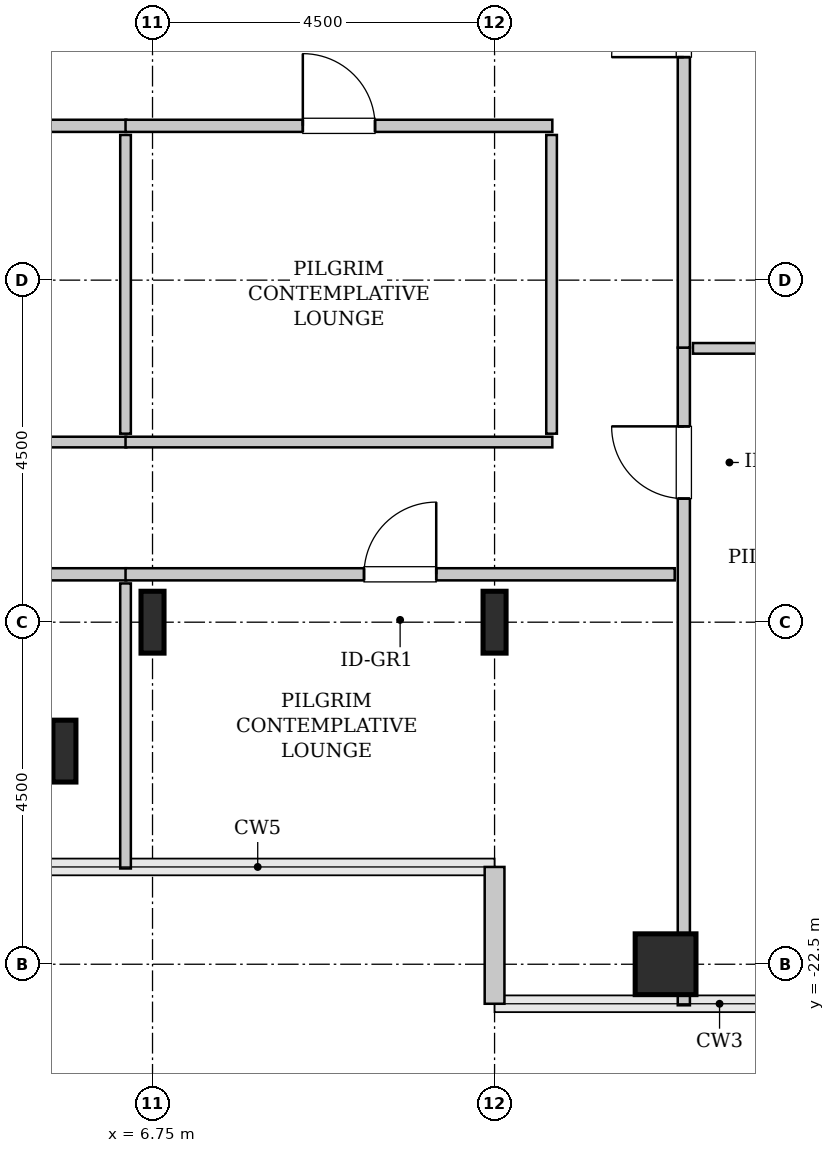
"""IFC4 building model, lengths in metres.
Left out: names, types, materials, properties, quantities, classifications, styles, units other than length and angle.
Written with IfcOpenShell. Run it as: python <this file> out.ifc"""

import sys

from ifc_helpers import new_model, si_unit, direction, frame, frame_2d, origin, origin_2d, place, context, subcontext, project, spatial, rectangle, hollow_rectangle, i_section, extrude, source, transform, mapped, element, fill, save


model = new_model("IFC4")
c1 = context("Model", 3, precision=1e-05, world=origin(), true_north=direction((0.0, 1.0)))
c2 = subcontext(c1, "Body", "Model", "MODEL_VIEW")
j1 = project(units=[si_unit("LENGTHUNIT", "METRE"), si_unit("PLANEANGLEUNIT", "RADIAN")], contexts=[c1])
p1 = place(None, origin())
s1 = spatial("IfcSite", under=j1, at=p1, CompositionType="ELEMENT")
p2 = place(p1, origin())
s2 = spatial("IfcBuilding", under=s1, at=p2, CompositionType="ELEMENT")
p3 = place(p2, frame((0.0, 0.0, 183.0)))
s3 = spatial("IfcBuildingStorey", under=s2, at=p3, CompositionType="ELEMENT", Elevation=183.0)
m1 = source(origin(), c2, "Body", "SweptSolid", [
    extrude(i_section(OverallWidth=0.303, OverallDepth=0.814, WebThickness=0.021, FlangeThickness=0.04, FilletRadius=0.03, at=origin_2d()), origin(), (0.0, 0.0, 1.0), 3.8),
])
for number, where, z_axis, x_axis in (
    (1, (5.591, -19.696, 0.0), (0.0, 0.0, 1.0), (1.0, 0.0, 0.0)),
    (2, (6.75, -18.0, 0.0), (0.0, 0.0, 1.0), (1.0, 0.0, 0.0)),
    (3, (11.25, -18.0, 0.0), (0.0, 0.0, 1.0), (1.0, 0.0, 0.0)),
):
    element("IfcColumn", number, at=place(p3, frame(where, z_axis=z_axis, x_axis=x_axis)), inside=s3, PredefinedType="COLUMN", context=c2, shape_type="MappedRepresentation", body=[
        mapped(m1, transform((0.0, 0.0, 0.0), x_axis=(1.0, 0.0, 0.0), y_axis=(0.0, 1.0, 0.0), z_axis=(0.0, 0.0, 1.0), scale=1.0)),
    ])
m2 = source(origin(), c2, "Body", "SweptSolid", [
    extrude(hollow_rectangle(XDim=0.8, YDim=0.8, WallThickness=0.04, InnerFilletRadius=0.04, OuterFilletRadius=0.08, at=origin_2d()), origin(), (0.0, 0.0, 1.0), 3.8),
])
p4 = place(p3, frame((13.5, -22.5, 0.0), z_axis=(0.0, 0.0, 1.0), x_axis=(1.0, 0.0, 0.0)))
e4 = element("IfcColumn", 4, at=p4, inside=s3, PredefinedType="COLUMN", context=c2, shape_type="MappedRepresentation", body=[
    mapped(m2, transform((0.0, 0.0, 0.0), x_axis=(1.0, 0.0, 0.0), y_axis=(0.0, 1.0, 0.0), z_axis=(0.0, 0.0, 1.0), scale=1.0)),
])
m3 = source(origin(), c2, "Body", "SweptSolid", [
    extrude(rectangle(XDim=1.8, YDim=0.26, at=frame_2d((0.9, 0.0))), origin(), (0.0, 0.0, 1.0), 3.55),
])
p5 = place(p3, frame((11.25, -21.22, 0.0), z_axis=(0.0, 0.0, 1.0), x_axis=(0.0, -1.0, 0.0)))
e5 = element("IfcWall", 5, at=p5, inside=s3, PredefinedType="SOLIDWALL", context=c2, shape_type="MappedRepresentation", body=[
    mapped(m3, transform((0.0, 0.0, 0.0), x_axis=(1.0, 0.0, 0.0), y_axis=(0.0, 1.0, 0.0), z_axis=(0.0, 0.0, 1.0), scale=1.0)),
])
m4 = source(origin(), c2, "Body", "SweptSolid", [
    extrude(rectangle(XDim=8.653, YDim=0.16, at=frame_2d((4.326, 0.0))), origin(), (0.0, 0.0, 1.0), 3.535),
])
p6 = place(p3, frame((13.74, -23.04, 0.0), z_axis=(0.0, 0.0, 1.0), x_axis=(0.0, 1.0, 0.0)))
e6 = element("IfcWall", 6, at=p6, inside=s3, PredefinedType="PARTITIONING", context=c2, shape_type="MappedRepresentation", body=[
    mapped(m4, transform((0.0, 0.0, 0.0), x_axis=(1.0, 0.0, 0.0), y_axis=(0.0, 1.0, 0.0), z_axis=(0.0, 0.0, 1.0), scale=1.0)),
])
p7 = place(p6, frame((6.666, 0.0, 0.0)))
e7 = element("IfcOpeningElement", 7, at=p7, cuts=e6, PredefinedType="OPENING", context=c2, shape_type="SweptSolid", body=[
    extrude(rectangle(XDim=0.95, YDim=2.1, at=frame_2d((0.475, 1.05))), frame((0.0, 0.09, 0.0), z_axis=(0.0, -1.0, 0.0), x_axis=(1.0, 0.0, 0.0)), (0.0, 0.0, 1.0), 0.18),
])
m5 = source(origin(), c2, "Body", "SweptSolid", [
    extrude(rectangle(XDim=11.43, YDim=0.14, at=frame_2d((5.715, 0.0))), origin(), (0.0, 0.0, 1.0), 3.535),
])
p8 = place(p3, frame((13.86, -14.397, 0.0), z_axis=(0.0, 0.0, 1.0), x_axis=(1.0, 0.0, 0.0)))
e8 = element("IfcWall", 8, at=p8, inside=s3, PredefinedType="PARTITIONING", context=c2, shape_type="MappedRepresentation", body=[
    mapped(m5, transform((0.0, 0.0, 0.0), x_axis=(1.0, 0.0, 0.0), y_axis=(0.0, 1.0, 0.0), z_axis=(0.0, 0.0, 1.0), scale=1.0)),
])
m6 = source(origin(), c2, "Body", "SweptSolid", [
    extrude(rectangle(XDim=8.593, YDim=0.16, at=frame_2d((4.296, 0.0))), origin(), (0.0, 0.0, 1.0), 3.535),
])
p9 = place(p3, frame((13.74, -14.387, 0.0), z_axis=(0.0, 0.0, 1.0), x_axis=(0.0, 1.0, 0.0)))
e9 = element("IfcWall", 9, at=p9, inside=s3, PredefinedType="PARTITIONING", context=c2, shape_type="MappedRepresentation", body=[
    mapped(m6, transform((0.0, 0.0, 0.0), x_axis=(1.0, 0.0, 0.0), y_axis=(0.0, 1.0, 0.0), z_axis=(0.0, 0.0, 1.0), scale=1.0)),
])
p10 = place(p9, frame((3.821, 0.0, 0.0)))
e10 = element("IfcOpeningElement", 10, at=p10, cuts=e9, PredefinedType="OPENING", context=c2, shape_type="SweptSolid", body=[
    extrude(rectangle(XDim=0.95, YDim=2.1, at=frame_2d((0.475, 1.05))), frame((0.0, 0.09, 0.0), z_axis=(0.0, -1.0, 0.0), x_axis=(1.0, 0.0, 0.0)), (0.0, 0.0, 1.0), 0.18),
])
m7 = source(origin(), c2, "Body", "SweptSolid", [
    extrude(rectangle(XDim=12.81, YDim=0.16, at=frame_2d((6.405, 0.0))), origin(), (0.0, 0.0, 1.0), 3.535),
])
p11 = place(p3, frame((-6.405, -17.37, 0.0), z_axis=(0.0, 0.0, 1.0), x_axis=(1.0, 0.0, 0.0)))
e11 = element("IfcWall", 11, at=p11, inside=s3, PredefinedType="PARTITIONING", context=c2, shape_type="MappedRepresentation", body=[
    mapped(m7, transform((0.0, 0.0, 0.0), x_axis=(1.0, 0.0, 0.0), y_axis=(0.0, 1.0, 0.0), z_axis=(0.0, 0.0, 1.0), scale=1.0)),
])
p12 = place(p11, frame((5.93, 0.0, 0.0)))
e12 = element("IfcOpeningElement", 12, at=p12, cuts=e11, PredefinedType="OPENING", context=c2, shape_type="SweptSolid", body=[
    extrude(rectangle(XDim=0.95, YDim=2.1, at=frame_2d((0.475, 1.05))), frame((0.0, 0.09, 0.0), z_axis=(0.0, -1.0, 0.0), x_axis=(1.0, 0.0, 0.0)), (0.0, 0.0, 1.0), 0.18),
])
m8 = source(origin(), c2, "Body", "SweptSolid", [
    extrude(rectangle(XDim=3.75, YDim=0.14, at=frame_2d((1.875, 0.0))), origin(), (0.0, 0.0, 1.0), 3.535),
])
p13 = place(p3, frame((6.395, -21.24, 0.0), z_axis=(0.0, 0.0, 1.0), x_axis=(0.0, 1.0, 0.0)))
e13 = element("IfcWall", 13, at=p13, inside=s3, PredefinedType="PARTITIONING", context=c2, shape_type="MappedRepresentation", body=[
    mapped(m8, transform((0.0, 0.0, 0.0), x_axis=(1.0, 0.0, 0.0), y_axis=(0.0, 1.0, 0.0), z_axis=(0.0, 0.0, 1.0), scale=1.0)),
])
p14 = place(p3, frame((-6.405, -11.47, 0.0), z_axis=(0.0, 0.0, 1.0), x_axis=(1.0, 0.0, 0.0)))
e14 = element("IfcWall", 14, at=p14, inside=s3, PredefinedType="PARTITIONING", context=c2, shape_type="MappedRepresentation", body=[
    mapped(m7, transform((0.0, 0.0, 0.0), x_axis=(1.0, 0.0, 0.0), y_axis=(0.0, 1.0, 0.0), z_axis=(0.0, 0.0, 1.0), scale=1.0)),
])
p15 = place(p14, frame((5.93, 0.0, 0.0)))
e15 = element("IfcOpeningElement", 15, at=p15, cuts=e14, PredefinedType="OPENING", context=c2, shape_type="SweptSolid", body=[
    extrude(rectangle(XDim=0.95, YDim=2.1, at=frame_2d((0.475, 1.05))), frame((0.0, 0.09, 0.0), z_axis=(0.0, -1.0, 0.0), x_axis=(1.0, 0.0, 0.0)), (0.0, 0.0, 1.0), 0.18),
])
m9 = source(origin(), c2, "Body", "SweptSolid", [
    extrude(rectangle(XDim=12.81, YDim=0.14, at=frame_2d((6.405, 0.0))), origin(), (0.0, 0.0, 1.0), 3.535),
])
p16 = place(p3, frame((-6.405, -15.63, 0.0), z_axis=(0.0, 0.0, 1.0), x_axis=(1.0, 0.0, 0.0)))
e16 = element("IfcWall", 16, at=p16, inside=s3, PredefinedType="PARTITIONING", context=c2, shape_type="MappedRepresentation", body=[
    mapped(m9, transform((0.0, 0.0, 0.0), x_axis=(1.0, 0.0, 0.0), y_axis=(0.0, 1.0, 0.0), z_axis=(0.0, 0.0, 1.0), scale=1.0)),
])
m10 = source(origin(), c2, "Body", "SweptSolid", [
    extrude(rectangle(XDim=3.93, YDim=0.14, at=frame_2d((1.965, 0.0))), origin(), (0.0, 0.0, 1.0), 3.535),
])
p17 = place(p3, frame((6.395, -15.52, 0.0), z_axis=(0.0, 0.0, 1.0), x_axis=(0.0, 1.0, 0.0)))
e17 = element("IfcWall", 17, at=p17, inside=s3, PredefinedType="PARTITIONING", context=c2, shape_type="MappedRepresentation", body=[
    mapped(m10, transform((0.0, 0.0, 0.0), x_axis=(1.0, 0.0, 0.0), y_axis=(0.0, 1.0, 0.0), z_axis=(0.0, 0.0, 1.0), scale=1.0)),
])
m11 = source(origin(), c2, "Body", "SweptSolid", [
    extrude(rectangle(XDim=7.225, YDim=0.16, at=frame_2d((3.613, 0.0))), origin(), (0.0, 0.0, 1.0), 3.535),
])
p18 = place(p3, frame((6.395, -17.37, 0.0), z_axis=(0.0, 0.0, 1.0), x_axis=(1.0, 0.0, 0.0)))
e18 = element("IfcWall", 18, at=p18, inside=s3, PredefinedType="PARTITIONING", context=c2, shape_type="MappedRepresentation", body=[
    mapped(m11, transform((0.0, 0.0, 0.0), x_axis=(1.0, 0.0, 0.0), y_axis=(0.0, 1.0, 0.0), z_axis=(0.0, 0.0, 1.0), scale=1.0)),
])
p19 = place(p18, frame((3.137, 0.0, 0.0)))
e19 = element("IfcOpeningElement", 19, at=p19, cuts=e18, PredefinedType="OPENING", context=c2, shape_type="SweptSolid", body=[
    extrude(rectangle(XDim=0.95, YDim=2.1, at=frame_2d((0.475, 1.05))), frame((0.0, 0.09, 0.0), z_axis=(0.0, -1.0, 0.0), x_axis=(1.0, 0.0, 0.0)), (0.0, 0.0, 1.0), 0.18),
])
m12 = source(origin(), c2, "Body", "SweptSolid", [
    extrude(rectangle(XDim=5.615, YDim=0.16, at=frame_2d((2.808, 0.0))), origin(), (0.0, 0.0, 1.0), 3.535),
])
p20 = place(p3, frame((6.395, -11.47, 0.0), z_axis=(0.0, 0.0, 1.0), x_axis=(1.0, 0.0, 0.0)))
e20 = element("IfcWall", 20, at=p20, inside=s3, PredefinedType="PARTITIONING", context=c2, shape_type="MappedRepresentation", body=[
    mapped(m12, transform((0.0, 0.0, 0.0), x_axis=(1.0, 0.0, 0.0), y_axis=(0.0, 1.0, 0.0), z_axis=(0.0, 0.0, 1.0), scale=1.0)),
])
p21 = place(p20, frame((2.333, 0.0, 0.0)))
e21 = element("IfcOpeningElement", 21, at=p21, cuts=e20, PredefinedType="OPENING", context=c2, shape_type="SweptSolid", body=[
    extrude(rectangle(XDim=0.95, YDim=2.1, at=frame_2d((0.475, 1.05))), frame((0.0, 0.09, 0.0), z_axis=(0.0, -1.0, 0.0), x_axis=(1.0, 0.0, 0.0)), (0.0, 0.0, 1.0), 0.18),
])
m13 = source(origin(), c2, "Body", "SweptSolid", [
    extrude(rectangle(XDim=5.615, YDim=0.14, at=frame_2d((2.808, 0.0))), origin(), (0.0, 0.0, 1.0), 3.535),
])
p22 = place(p3, frame((6.395, -15.63, 0.0), z_axis=(0.0, 0.0, 1.0), x_axis=(1.0, 0.0, 0.0)))
e22 = element("IfcWall", 22, at=p22, inside=s3, PredefinedType="PARTITIONING", context=c2, shape_type="MappedRepresentation", body=[
    mapped(m13, transform((0.0, 0.0, 0.0), x_axis=(1.0, 0.0, 0.0), y_axis=(0.0, 1.0, 0.0), z_axis=(0.0, 0.0, 1.0), scale=1.0)),
])
p23 = place(p3, frame((12.0, -15.52, 0.0), z_axis=(0.0, 0.0, 1.0), x_axis=(0.0, 1.0, 0.0)))
e23 = element("IfcWall", 23, at=p23, inside=s3, PredefinedType="PARTITIONING", context=c2, shape_type="MappedRepresentation", body=[
    mapped(m10, transform((0.0, 0.0, 0.0), x_axis=(1.0, 0.0, 0.0), y_axis=(0.0, 1.0, 0.0), z_axis=(0.0, 0.0, 1.0), scale=1.0)),
])
m14 = source(origin(), c2, "Body", "SweptSolid", [
    extrude(rectangle(XDim=0.95, YDim=2.1, at=frame_2d((0.475, 1.05))), frame((0.0, 0.025, 0.0), z_axis=(0.0, -1.0, 0.0), x_axis=(1.0, 0.0, 0.0)), (0.0, 0.0, 1.0), 0.05),
])
p24 = place(p7, origin())
e24 = element("IfcDoor", 24, at=p24, inside=s3, OperationType="SINGLE_SWING_RIGHT", PredefinedType="DOOR", context=c2, shape_type="MappedRepresentation", body=[
    mapped(m14, transform((0.0, 0.0, 0.0), x_axis=(1.0, 0.0, 0.0), y_axis=(0.0, 1.0, 0.0), z_axis=(0.0, 0.0, 1.0), scale=1.0)),
])
fill(e7, e24)
p25 = place(p10, origin())
e25 = element("IfcDoor", 25, at=p25, inside=s3, OperationType="SINGLE_SWING_LEFT", PredefinedType="DOOR", context=c2, shape_type="MappedRepresentation", body=[
    mapped(m14, transform((0.0, 0.0, 0.0), x_axis=(1.0, 0.0, 0.0), y_axis=(0.0, 1.0, 0.0), z_axis=(0.0, 0.0, 1.0), scale=1.0)),
])
fill(e10, e25)
p26 = place(p19, origin())
e26 = element("IfcDoor", 26, at=p26, inside=s3, OperationType="SINGLE_SWING_RIGHT", PredefinedType="DOOR", context=c2, shape_type="MappedRepresentation", body=[
    mapped(m14, transform((0.0, 0.0, 0.0), x_axis=(1.0, 0.0, 0.0), y_axis=(0.0, 1.0, 0.0), z_axis=(0.0, 0.0, 1.0), scale=1.0)),
])
fill(e19, e26)
p27 = place(p21, origin())
e27 = element("IfcDoor", 27, at=p27, inside=s3, OperationType="SINGLE_SWING_LEFT", PredefinedType="DOOR", context=c2, shape_type="MappedRepresentation", body=[
    mapped(m14, transform((0.0, 0.0, 0.0), x_axis=(1.0, 0.0, 0.0), y_axis=(0.0, 1.0, 0.0), z_axis=(0.0, 0.0, 1.0), scale=1.0)),
])
fill(e21, e27)
save(model, sys.argv[1])
